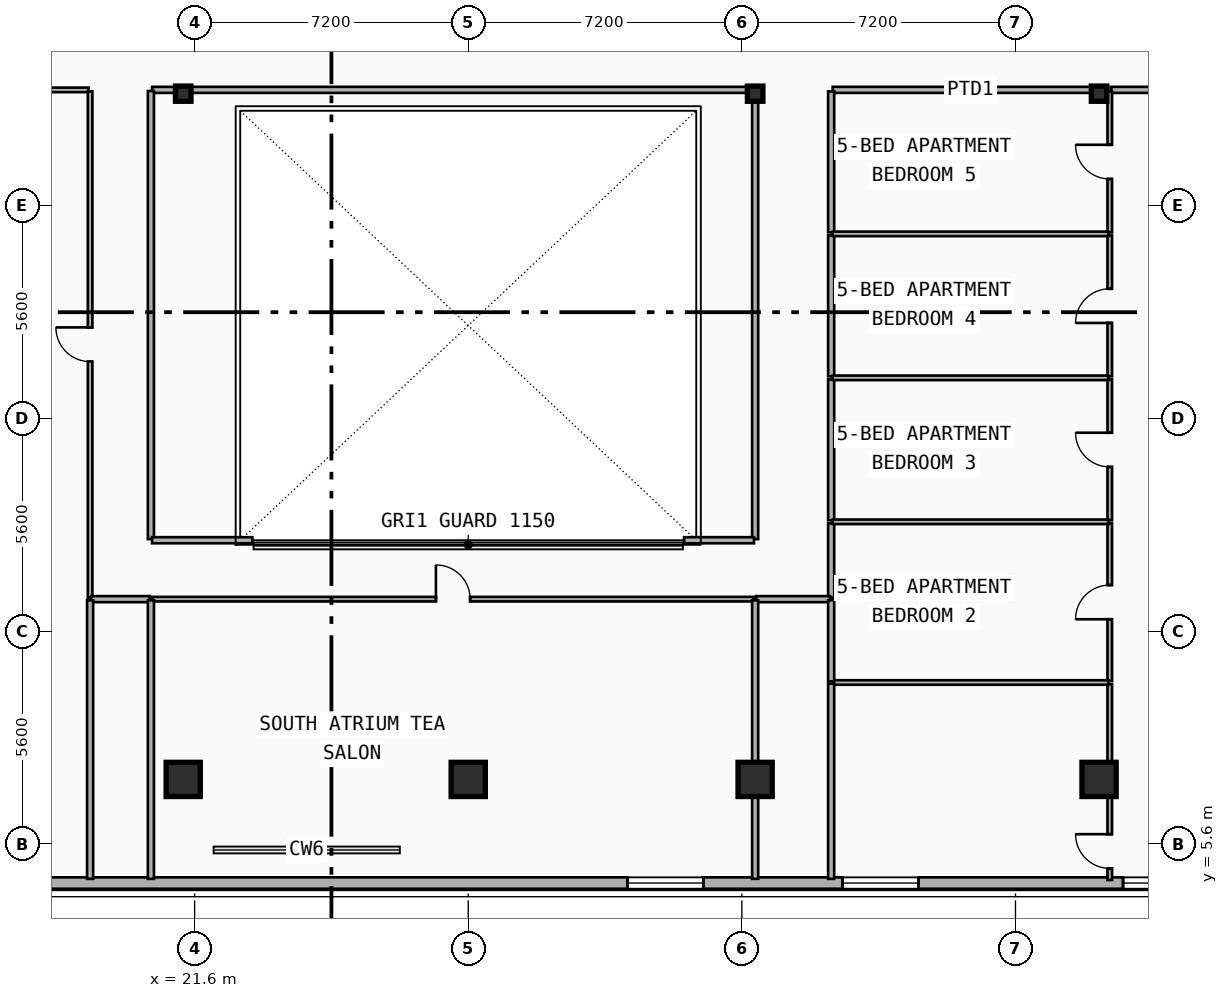
"""IFC4 building model, lengths in metres.
Left out: names, types, materials, properties, quantities, classifications, styles, units other than length and angle.
Written with IfcOpenShell. Run it as: python <this file> out.ifc"""

import sys

from ifc_helpers import new_model, si_unit, direction, frame, frame_2d, origin, origin_2d, place, context, subcontext, project, spatial, rectangle, i_section, extrude, element, fill, save


model = new_model("IFC4")
c1 = context("Model", 3, precision=1e-05, world=origin(), true_north=direction((0.0, 1.0)))
c2 = subcontext(c1, "Body", "Model", "MODEL_VIEW")
j1 = project(units=[si_unit("LENGTHUNIT", "METRE"), si_unit("PLANEANGLEUNIT", "RADIAN")], contexts=[c1])
p1 = place(None, origin())
s1 = spatial("IfcSite", under=j1, at=p1, CompositionType="ELEMENT")
p2 = place(p1, origin())
s2 = spatial("IfcBuilding", under=s1, at=p2, CompositionType="ELEMENT")
p3 = place(p2, frame((0.0, 0.0, 207.6)))
s3 = spatial("IfcBuildingStorey", under=s2, at=p3, CompositionType="ELEMENT", Elevation=207.6)
for number, where, z_axis, x_axis in (
    (1, (21.3, 25.35, 0.0), (0.0, 0.0, 1.0), (1.0, 0.0, 0.0)),
    (2, (36.35, 25.35, 0.0), (0.0, 0.0, 1.0), (1.0, 0.0, 0.0)),
    (3, (45.4, 25.35, 0.0), (0.0, 0.0, 1.0), (1.0, 0.0, 0.0)),
):
    element("IfcColumn", number, at=place(p3, frame(where, z_axis=z_axis, x_axis=x_axis)), inside=s3, PredefinedType="COLUMN", context=c2, shape_type="SweptSolid", body=[
        extrude(i_section(OverallWidth=0.408, OverallDepth=0.4, WebThickness=0.025, FlangeThickness=0.039, FilletRadius=0.015, at=origin_2d()), origin(), (0.0, 0.0, 1.0), 3.6),
    ])
for number, where, z_axis, x_axis in (
    (4, (21.3, 7.415, 0.0), (0.0, -0.09, 0.996), (1.0, 0.0, 0.0)),
    (5, (28.8, 7.415, 0.0), (0.0, -0.09, 0.996), (1.0, 0.0, 0.0)),
    (6, (36.35, 7.415, 0.0), (0.0, -0.09, 0.996), (1.0, 0.0, 0.0)),
    (7, (45.4, 7.415, 0.0), (0.0, -0.09, 0.996), (1.0, 0.0, 0.0)),
):
    element("IfcColumn", number, at=place(p3, frame(where, z_axis=z_axis, x_axis=x_axis)), inside=s3, PredefinedType="COLUMN", context=c2, shape_type="SweptSolid", body=[
        extrude(rectangle(XDim=0.9, YDim=0.9, at=origin_2d()), origin(), (0.0, 0.0, 1.0), 3.615),
    ])
p4 = place(p3, frame((48.0, 4.58, 0.0), z_axis=(0.0, 0.0, 1.0), x_axis=(-1.0, 0.0, 0.0)))
e8 = element("IfcWall", 8, at=p4, inside=s3, PredefinedType="SOLIDWALL", context=c2, shape_type="SweptSolid", body=[
    extrude(rectangle(XDim=38.4, YDim=0.3, at=frame_2d((19.2, 0.0))), origin(), (0.0, 0.0, 1.0), 3.34),
])
p5 = place(p4, frame((36.19, 0.0, 0.48)))
e9 = element("IfcOpeningElement", 9, at=p5, cuts=e8, PredefinedType="OPENING", context=c2, shape_type="SweptSolid", body=[
    extrude(rectangle(XDim=1.8, YDim=1.8, at=frame_2d((0.9, 0.9))), frame((0.0, 0.16, 0.0), z_axis=(0.0, -1.0, 0.0), x_axis=(1.0, 0.0, 0.0)), (0.0, 0.0, 1.0), 0.32),
])
p6 = place(p4, frame((31.475, 0.0, 0.65)))
e10 = element("IfcOpeningElement", 10, at=p6, cuts=e8, PredefinedType="OPENING", context=c2, shape_type="SweptSolid", body=[
    extrude(rectangle(XDim=2.0, YDim=2.2, at=frame_2d((1.0, 1.1))), frame((0.0, 0.16, 0.0), z_axis=(0.0, -1.0, 0.0), x_axis=(1.0, 0.0, 0.0)), (0.0, 0.0, 1.0), 0.32),
])
p7 = place(p4, frame((13.014, 0.0, 0.65)))
e11 = element("IfcOpeningElement", 11, at=p7, cuts=e8, PredefinedType="OPENING", context=c2, shape_type="SweptSolid", body=[
    extrude(rectangle(XDim=2.0, YDim=2.2, at=frame_2d((1.0, 1.1))), frame((0.0, 0.16, 0.0), z_axis=(0.0, -1.0, 0.0), x_axis=(1.0, 0.0, 0.0)), (0.0, 0.0, 1.0), 0.32),
])
p8 = place(p4, frame((0.369, 0.0, 0.75)))
e12 = element("IfcOpeningElement", 12, at=p8, cuts=e8, PredefinedType="OPENING", context=c2, shape_type="SweptSolid", body=[
    extrude(rectangle(XDim=1.6, YDim=1.95, at=frame_2d((0.8, 0.975))), frame((0.0, 0.16, 0.0), z_axis=(0.0, -1.0, 0.0), x_axis=(1.0, 0.0, 0.0)), (0.0, 0.0, 1.0), 0.32),
])
p9 = place(p4, frame((7.35, 0.0, 0.65)))
e13 = element("IfcOpeningElement", 13, at=p9, cuts=e8, PredefinedType="OPENING", context=c2, shape_type="SweptSolid", body=[
    extrude(rectangle(XDim=2.0, YDim=2.2, at=frame_2d((1.0, 1.1))), frame((0.0, 0.16, 0.0), z_axis=(0.0, -1.0, 0.0), x_axis=(1.0, 0.0, 0.0)), (0.0, 0.0, 1.0), 0.32),
])
p10 = place(p3, frame((12.24, 25.45, 0.0), z_axis=(0.0, 0.0, 1.0), x_axis=(1.0, 0.0, 0.0)))
e14 = element("IfcWall", 14, at=p10, inside=s3, PredefinedType="PARTITIONING", context=c2, shape_type="SweptSolid", body=[
    extrude(rectangle(XDim=6.57, YDim=0.12, at=frame_2d((3.285, 0.0))), origin(), (0.0, 0.0, 1.0), 2.52),
])
p11 = place(p10, frame((2.835, 0.0, 0.0)))
e15 = element("IfcOpeningElement", 15, at=p11, cuts=e14, PredefinedType="OPENING", context=c2, shape_type="SweptSolid", body=[
    extrude(rectangle(XDim=0.9, YDim=2.1, at=frame_2d((0.45, 1.05))), frame((0.0, 0.07, 0.0), z_axis=(0.0, -1.0, 0.0), x_axis=(1.0, 0.0, 0.0)), (0.0, 0.0, 1.0), 0.14),
])
p12 = place(p3, frame((45.721, 25.45, 0.0), z_axis=(0.0, 0.0, 1.0), x_axis=(1.0, 0.0, 0.0)))
e16 = element("IfcWall", 16, at=p12, inside=s3, PredefinedType="PARTITIONING", context=c2, shape_type="SweptSolid", body=[
    extrude(rectangle(XDim=3.479, YDim=0.16, at=frame_2d((1.74, 0.0))), origin(), (0.0, 0.0, 1.0), 2.52),
])
p13 = place(p12, frame((1.24, 0.0, 0.0)))
e17 = element("IfcOpeningElement", 17, at=p13, cuts=e16, PredefinedType="OPENING", context=c2, shape_type="SweptSolid", body=[
    extrude(rectangle(XDim=1.0, YDim=2.15, at=frame_2d((0.5, 1.075))), frame((0.0, 0.09, 0.0), z_axis=(0.0, -1.0, 0.0), x_axis=(1.0, 0.0, 0.0)), (0.0, 0.0, 1.0), 0.18),
])
p14 = place(p3, frame((38.39, 25.45, 0.0), z_axis=(0.0, 0.0, 1.0), x_axis=(1.0, 0.0, 0.0)))
e18 = element("IfcWall", 18, at=p14, inside=s3, PredefinedType="PARTITIONING", context=c2, shape_type="SweptSolid", body=[
    extrude(rectangle(XDim=7.251, YDim=0.16, at=frame_2d((3.625, 0.0))), origin(), (0.0, 0.0, 1.0), 2.52),
])
p15 = place(p3, frame((18.85, 12.09, 0.0), z_axis=(0.0, 0.0, 1.0), x_axis=(0.0, 1.0, 0.0)))
e19 = element("IfcWall", 19, at=p15, inside=s3, PredefinedType="PARTITIONING", context=c2, shape_type="SweptSolid", body=[
    extrude(rectangle(XDim=13.32, YDim=0.12, at=frame_2d((6.66, 0.0))), origin(), (0.0, 0.0, 1.0), 2.77),
])
p16 = place(p15, frame((6.21, 0.0, 0.0)))
e20 = element("IfcOpeningElement", 20, at=p16, cuts=e19, PredefinedType="OPENING", context=c2, shape_type="SweptSolid", body=[
    extrude(rectangle(XDim=0.9, YDim=2.1, at=frame_2d((0.45, 1.05))), frame((0.0, 0.07, 0.0), z_axis=(0.0, -1.0, 0.0), x_axis=(1.0, 0.0, 0.0)), (0.0, 0.0, 1.0), 0.14),
])
p17 = place(p3, frame((38.35, 12.09, 0.0), z_axis=(0.0, 0.0, 1.0), x_axis=(0.0, 1.0, 0.0)))
e21 = element("IfcWall", 21, at=p17, inside=s3, PredefinedType="PARTITIONING", context=c2, shape_type="SweptSolid", body=[
    extrude(rectangle(XDim=1.955, YDim=0.16, at=frame_2d((0.978, 0.0))), origin(), (0.0, 0.0, 1.0), 3.34),
])
p18 = place(p3, frame((38.35, 14.125, 0.0), z_axis=(0.0, 0.0, 1.0), x_axis=(0.0, 1.0, 0.0)))
e22 = element("IfcWall", 22, at=p18, inside=s3, PredefinedType="PARTITIONING", context=c2, shape_type="SweptSolid", body=[
    extrude(rectangle(XDim=3.708, YDim=0.16, at=frame_2d((1.854, 0.0))), origin(), (0.0, 0.0, 1.0), 2.77),
])
p19 = place(p3, frame((38.35, 17.913, 0.0), z_axis=(0.0, 0.0, 1.0), x_axis=(0.0, 1.0, 0.0)))
e23 = element("IfcWall", 23, at=p19, inside=s3, PredefinedType="PARTITIONING", context=c2, shape_type="SweptSolid", body=[
    extrude(rectangle(XDim=3.708, YDim=0.16, at=frame_2d((1.854, 0.0))), origin(), (0.0, 0.0, 1.0), 2.93),
])
p20 = place(p3, frame((38.35, 21.701, 0.0), z_axis=(0.0, 0.0, 1.0), x_axis=(0.0, 1.0, 0.0)))
e24 = element("IfcWall", 24, at=p20, inside=s3, PredefinedType="PARTITIONING", context=c2, shape_type="SweptSolid", body=[
    extrude(rectangle(XDim=3.709, YDim=0.16, at=frame_2d((1.854, 0.0))), origin(), (0.0, 0.0, 1.0), 2.77),
])
p21 = place(p3, frame((20.49, 12.05, 0.0), z_axis=(0.0, 0.0, 1.0), x_axis=(1.0, 0.0, 0.0)))
e25 = element("IfcWall", 25, at=p21, inside=s3, PredefinedType="PARTITIONING", context=c2, shape_type="SweptSolid", body=[
    extrude(rectangle(XDim=15.82, YDim=0.12, at=frame_2d((7.91, 0.0))), origin(), (0.0, 0.0, 1.0), 2.52),
])
p22 = place(p21, frame((7.46, 0.0, 0.0)))
e26 = element("IfcOpeningElement", 26, at=p22, cuts=e25, PredefinedType="OPENING", context=c2, shape_type="SweptSolid", body=[
    extrude(rectangle(XDim=0.9, YDim=2.1, at=frame_2d((0.45, 1.05))), frame((0.0, 0.07, 0.0), z_axis=(0.0, -1.0, 0.0), x_axis=(1.0, 0.0, 0.0)), (0.0, 0.0, 1.0), 0.14),
])
p23 = place(p3, frame((45.681, 4.66, 0.0), z_axis=(0.0, 0.0, 1.0), x_axis=(0.0, 1.0, 0.0)))
e27 = element("IfcWall", 27, at=p23, inside=s3, PredefinedType="PARTITIONING", context=c2, shape_type="SweptSolid", body=[
    extrude(rectangle(XDim=5.157, YDim=0.12, at=frame_2d((2.579, 0.0))), origin(), (0.0, 0.0, 1.0), 2.52),
])
p24 = place(p23, frame((0.306, 0.0, 0.0)))
e28 = element("IfcOpeningElement", 28, at=p24, cuts=e27, PredefinedType="OPENING", context=c2, shape_type="SweptSolid", body=[
    extrude(rectangle(XDim=0.9, YDim=2.1, at=frame_2d((0.45, 1.05))), frame((0.0, 0.07, 0.0), z_axis=(0.0, -1.0, 0.0), x_axis=(1.0, 0.0, 0.0)), (0.0, 0.0, 1.0), 0.14),
])
p25 = place(p3, frame((45.681, 9.897, 0.0), z_axis=(0.0, 0.0, 1.0), x_axis=(0.0, 1.0, 0.0)))
e29 = element("IfcWall", 29, at=p25, inside=s3, PredefinedType="PARTITIONING", context=c2, shape_type="SweptSolid", body=[
    extrude(rectangle(XDim=4.148, YDim=0.12, at=frame_2d((2.074, 0.0))), origin(), (0.0, 0.0, 1.0), 2.52),
])
p26 = place(p25, frame((1.624, 0.0, 0.0)))
e30 = element("IfcOpeningElement", 30, at=p26, cuts=e29, PredefinedType="OPENING", context=c2, shape_type="SweptSolid", body=[
    extrude(rectangle(XDim=0.9, YDim=2.1, at=frame_2d((0.45, 1.05))), frame((0.0, 0.07, 0.0), z_axis=(0.0, -1.0, 0.0), x_axis=(1.0, 0.0, 0.0)), (0.0, 0.0, 1.0), 0.14),
])
p27 = place(p3, frame((45.681, 14.125, 0.0), z_axis=(0.0, 0.0, 1.0), x_axis=(0.0, 1.0, 0.0)))
e31 = element("IfcWall", 31, at=p27, inside=s3, PredefinedType="PARTITIONING", context=c2, shape_type="SweptSolid", body=[
    extrude(rectangle(XDim=3.708, YDim=0.12, at=frame_2d((1.854, 0.0))), origin(), (0.0, 0.0, 1.0), 2.52),
])
p28 = place(p27, frame((1.404, 0.0, 0.0)))
e32 = element("IfcOpeningElement", 32, at=p28, cuts=e31, PredefinedType="OPENING", context=c2, shape_type="SweptSolid", body=[
    extrude(rectangle(XDim=0.9, YDim=2.1, at=frame_2d((0.45, 1.05))), frame((0.0, 0.07, 0.0), z_axis=(0.0, -1.0, 0.0), x_axis=(1.0, 0.0, 0.0)), (0.0, 0.0, 1.0), 0.14),
])
p29 = place(p3, frame((45.681, 17.913, 0.0), z_axis=(0.0, 0.0, 1.0), x_axis=(0.0, 1.0, 0.0)))
e33 = element("IfcWall", 33, at=p29, inside=s3, PredefinedType="PARTITIONING", context=c2, shape_type="SweptSolid", body=[
    extrude(rectangle(XDim=3.708, YDim=0.12, at=frame_2d((1.854, 0.0))), origin(), (0.0, 0.0, 1.0), 2.52),
])
p30 = place(p29, frame((1.404, 0.0, 0.0)))
e34 = element("IfcOpeningElement", 34, at=p30, cuts=e33, PredefinedType="OPENING", context=c2, shape_type="SweptSolid", body=[
    extrude(rectangle(XDim=0.9, YDim=2.1, at=frame_2d((0.45, 1.05))), frame((0.0, 0.07, 0.0), z_axis=(0.0, -1.0, 0.0), x_axis=(1.0, 0.0, 0.0)), (0.0, 0.0, 1.0), 0.14),
])
p31 = place(p3, frame((45.681, 21.701, 0.0), z_axis=(0.0, 0.0, 1.0), x_axis=(0.0, 1.0, 0.0)))
e35 = element("IfcWall", 35, at=p31, inside=s3, PredefinedType="PARTITIONING", context=c2, shape_type="SweptSolid", body=[
    extrude(rectangle(XDim=3.709, YDim=0.12, at=frame_2d((1.854, 0.0))), origin(), (0.0, 0.0, 1.0), 2.52),
])
p32 = place(p31, frame((1.405, 0.0, 0.0)))
e36 = element("IfcOpeningElement", 36, at=p32, cuts=e35, PredefinedType="OPENING", context=c2, shape_type="SweptSolid", body=[
    extrude(rectangle(XDim=0.9, YDim=2.1, at=frame_2d((0.45, 1.05))), frame((0.0, 0.07, 0.0), z_axis=(0.0, -1.0, 0.0), x_axis=(1.0, 0.0, 0.0)), (0.0, 0.0, 1.0), 0.14),
])
for number, where, z_axis, x_axis in (
    (37, (38.39, 9.857, 0.0), (0.0, 0.0, 1.0), (1.0, 0.0, 0.0)),
    (38, (38.39, 14.085, 0.0), (0.0, 0.0, 1.0), (1.0, 0.0, 0.0)),
    (39, (38.39, 17.873, 0.0), (0.0, 0.0, 1.0), (1.0, 0.0, 0.0)),
    (40, (38.39, 21.661, 0.0), (0.0, 0.0, 1.0), (1.0, 0.0, 0.0)),
):
    element("IfcWall", number, at=place(p3, frame(where, z_axis=z_axis, x_axis=x_axis)), inside=s3, PredefinedType="PARTITIONING", context=c2, shape_type="SweptSolid", body=[
        extrude(rectangle(XDim=7.251, YDim=0.12, at=frame_2d((3.625, 0.0))), origin(), (0.0, 0.0, 1.0), 2.52),
    ])
p33 = place(p3, frame((20.48, 25.45, 0.0), z_axis=(0.0, 0.0, 1.0), x_axis=(1.0, 0.0, 0.0)))
e41 = element("IfcWall", 41, at=p33, inside=s3, PredefinedType="PARTITIONING", context=c2, shape_type="SweptSolid", body=[
    extrude(rectangle(XDim=15.84, YDim=0.16, at=frame_2d((7.92, 0.0))), origin(), (0.0, 0.0, 1.0), 2.52),
])
p34 = place(p3, frame((18.88, 12.05, 0.0), z_axis=(0.0, 0.0, 1.0), x_axis=(1.0, 0.0, 0.0)))
e42 = element("IfcWall", 42, at=p34, inside=s3, PredefinedType="PARTITIONING", context=c2, shape_type="SweptSolid", body=[
    extrude(rectangle(XDim=1.54, YDim=0.16, at=frame_2d((0.77, 0.0))), origin(), (0.0, 0.0, 1.0), 3.34),
])
p35 = place(p3, frame((20.45, 13.63, 0.0), z_axis=(0.0, 0.0, 1.0), x_axis=(0.0, 1.0, 0.0)))
e43 = element("IfcWall", 43, at=p35, inside=s3, PredefinedType="PARTITIONING", context=c2, shape_type="SweptSolid", body=[
    extrude(rectangle(XDim=11.79, YDim=0.16, at=frame_2d((5.895, 0.0))), origin(), (0.0, 0.0, 1.0), 2.77),
])
p36 = place(p3, frame((36.38, 12.05, 0.0), z_axis=(0.0, 0.0, 1.0), x_axis=(1.0, 0.0, 0.0)))
e44 = element("IfcWall", 44, at=p36, inside=s3, PredefinedType="PARTITIONING", context=c2, shape_type="SweptSolid", body=[
    extrude(rectangle(XDim=1.94, YDim=0.16, at=frame_2d((0.97, 0.0))), origin(), (0.0, 0.0, 1.0), 2.52),
])
p37 = place(p3, frame((36.35, 13.63, 0.0), z_axis=(0.0, 0.0, 1.0), x_axis=(0.0, 1.0, 0.0)))
e45 = element("IfcWall", 45, at=p37, inside=s3, PredefinedType="PARTITIONING", context=c2, shape_type="SweptSolid", body=[
    extrude(rectangle(XDim=11.79, YDim=0.16, at=frame_2d((5.895, 0.0))), origin(), (0.0, 0.0, 1.0), 2.52),
])
p38 = place(p3, frame((20.48, 13.6, 0.0), z_axis=(0.0, 0.0, 1.0), x_axis=(1.0, 0.0, 0.0)))
e46 = element("IfcWall", 46, at=p38, inside=s3, PredefinedType="PARTITIONING", context=c2, shape_type="SweptSolid", body=[
    extrude(rectangle(XDim=2.64, YDim=0.16, at=frame_2d((1.32, 0.0))), origin(), (0.0, 0.0, 1.0), 2.52),
])
p39 = place(p3, frame((34.48, 13.6, 0.0), z_axis=(0.0, 0.0, 1.0), x_axis=(1.0, 0.0, 0.0)))
e47 = element("IfcWall", 47, at=p39, inside=s3, PredefinedType="PARTITIONING", context=c2, shape_type="SweptSolid", body=[
    extrude(rectangle(XDim=1.84, YDim=0.16, at=frame_2d((0.92, 0.0))), origin(), (0.0, 0.0, 1.0), 2.52),
])
for number, where, z_axis, x_axis in (
    (48, (18.85, 4.69, 0.0), (0.0, 0.0, 1.0), (0.0, 1.0, 0.0)),
    (49, (20.45, 4.69, 0.0), (0.0, 0.0, 1.0), (0.0, 1.0, 0.0)),
):
    element("IfcWall", number, at=place(p3, frame(where, z_axis=z_axis, x_axis=x_axis)), inside=s3, PredefinedType="PARTITIONING", context=c2, shape_type="SweptSolid", body=[
        extrude(rectangle(XDim=7.33, YDim=0.16, at=frame_2d((3.665, 0.0))), origin(), (0.0, 0.0, 1.0), 2.93),
    ])
p40 = place(p3, frame((36.35, 4.69, 0.0), z_axis=(0.0, 0.0, 1.0), x_axis=(0.0, 1.0, 0.0)))
e50 = element("IfcWall", 50, at=p40, inside=s3, PredefinedType="PARTITIONING", context=c2, shape_type="SweptSolid", body=[
    extrude(rectangle(XDim=7.33, YDim=0.16, at=frame_2d((3.665, 0.0))), origin(), (0.0, 0.0, 1.0), 2.52),
])
p41 = place(p3, frame((38.35, 4.69, 0.0), z_axis=(0.0, 0.0, 1.0), x_axis=(0.0, 1.0, 0.0)))
e51 = element("IfcWall", 51, at=p41, inside=s3, PredefinedType="PARTITIONING", context=c2, shape_type="SweptSolid", body=[
    extrude(rectangle(XDim=5.137, YDim=0.16, at=frame_2d((2.568, 0.0))), origin(), (0.0, 0.0, 1.0), 3.0),
])
p42 = place(p3, frame((38.35, 9.887, 0.0), z_axis=(0.0, 0.0, 1.0), x_axis=(0.0, 1.0, 0.0)))
e52 = element("IfcWall", 52, at=p42, inside=s3, PredefinedType="PARTITIONING", context=c2, shape_type="SweptSolid", body=[
    extrude(rectangle(XDim=2.133, YDim=0.16, at=frame_2d((1.066, 0.0))), origin(), (0.0, 0.0, 1.0), 2.93),
])
p43 = place(p7, origin())
e53 = element("IfcWindow", 53, at=p43, inside=s3, PartitioningType="SINGLE_PANEL", PredefinedType="WINDOW", context=c2, shape_type="SweptSolid", body=[
    extrude(rectangle(XDim=2.0, YDim=2.2, at=frame_2d((1.0, 1.1))), frame((0.0, 0.03, 0.0), z_axis=(0.0, -1.0, 0.0), x_axis=(1.0, 0.0, 0.0)), (0.0, 0.0, 1.0), 0.06),
])
fill(e11, e53)
p44 = place(p8, origin())
e54 = element("IfcWindow", 54, at=p44, inside=s3, PartitioningType="SINGLE_PANEL", PredefinedType="WINDOW", context=c2, shape_type="SweptSolid", body=[
    extrude(rectangle(XDim=1.6, YDim=1.95, at=frame_2d((0.8, 0.975))), frame((0.0, 0.03, 0.0), z_axis=(0.0, -1.0, 0.0), x_axis=(1.0, 0.0, 0.0)), (0.0, 0.0, 1.0), 0.06),
])
fill(e12, e54)
p45 = place(p9, origin())
e55 = element("IfcWindow", 55, at=p45, inside=s3, PartitioningType="SINGLE_PANEL", PredefinedType="WINDOW", context=c2, shape_type="SweptSolid", body=[
    extrude(rectangle(XDim=2.0, YDim=2.2, at=frame_2d((1.0, 1.1))), frame((0.0, 0.03, 0.0), z_axis=(0.0, -1.0, 0.0), x_axis=(1.0, 0.0, 0.0)), (0.0, 0.0, 1.0), 0.06),
])
fill(e13, e55)
p46 = place(p16, origin())
e56 = element("IfcDoor", 56, at=p46, inside=s3, OperationType="SINGLE_SWING_RIGHT", PredefinedType="DOOR", context=c2, shape_type="SweptSolid", body=[
    extrude(rectangle(XDim=0.9, YDim=2.1, at=frame_2d((0.45, 1.05))), frame((0.0, 0.025, 0.0), z_axis=(0.0, -1.0, 0.0), x_axis=(1.0, 0.0, 0.0)), (0.0, 0.0, 1.0), 0.05),
])
fill(e20, e56)
p47 = place(p22, origin())
e57 = element("IfcDoor", 57, at=p47, inside=s3, OperationType="SINGLE_SWING_LEFT", PredefinedType="DOOR", context=c2, shape_type="SweptSolid", body=[
    extrude(rectangle(XDim=0.9, YDim=2.1, at=frame_2d((0.45, 1.05))), frame((0.0, 0.025, 0.0), z_axis=(0.0, -1.0, 0.0), x_axis=(1.0, 0.0, 0.0)), (0.0, 0.0, 1.0), 0.05),
])
fill(e26, e57)
p48 = place(p24, origin())
e58 = element("IfcDoor", 58, at=p48, inside=s3, OperationType="SINGLE_SWING_RIGHT", PredefinedType="DOOR", context=c2, shape_type="SweptSolid", body=[
    extrude(rectangle(XDim=0.9, YDim=2.1, at=frame_2d((0.45, 1.05))), frame((0.0, 0.025, 0.0), z_axis=(0.0, -1.0, 0.0), x_axis=(1.0, 0.0, 0.0)), (0.0, 0.0, 1.0), 0.05),
])
fill(e28, e58)
p49 = place(p26, origin())
e59 = element("IfcDoor", 59, at=p49, inside=s3, OperationType="SINGLE_SWING_LEFT", PredefinedType="DOOR", context=c2, shape_type="SweptSolid", body=[
    extrude(rectangle(XDim=0.9, YDim=2.1, at=frame_2d((0.45, 1.05))), frame((0.0, 0.025, 0.0), z_axis=(0.0, -1.0, 0.0), x_axis=(1.0, 0.0, 0.0)), (0.0, 0.0, 1.0), 0.05),
])
fill(e30, e59)
p50 = place(p28, origin())
e60 = element("IfcDoor", 60, at=p50, inside=s3, OperationType="SINGLE_SWING_RIGHT", PredefinedType="DOOR", context=c2, shape_type="SweptSolid", body=[
    extrude(rectangle(XDim=0.9, YDim=2.1, at=frame_2d((0.45, 1.05))), frame((0.0, 0.025, 0.0), z_axis=(0.0, -1.0, 0.0), x_axis=(1.0, 0.0, 0.0)), (0.0, 0.0, 1.0), 0.05),
])
fill(e32, e60)
p51 = place(p30, origin())
e61 = element("IfcDoor", 61, at=p51, inside=s3, OperationType="SINGLE_SWING_LEFT", PredefinedType="DOOR", context=c2, shape_type="SweptSolid", body=[
    extrude(rectangle(XDim=0.9, YDim=2.1, at=frame_2d((0.45, 1.05))), frame((0.0, 0.025, 0.0), z_axis=(0.0, -1.0, 0.0), x_axis=(1.0, 0.0, 0.0)), (0.0, 0.0, 1.0), 0.05),
])
fill(e34, e61)
p52 = place(p32, origin())
e62 = element("IfcDoor", 62, at=p52, inside=s3, OperationType="SINGLE_SWING_RIGHT", PredefinedType="DOOR", context=c2, shape_type="SweptSolid", body=[
    extrude(rectangle(XDim=0.9, YDim=2.1, at=frame_2d((0.45, 1.05))), frame((0.0, 0.025, 0.0), z_axis=(0.0, -1.0, 0.0), x_axis=(1.0, 0.0, 0.0)), (0.0, 0.0, 1.0), 0.05),
])
fill(e36, e62)
save(model, sys.argv[1])
